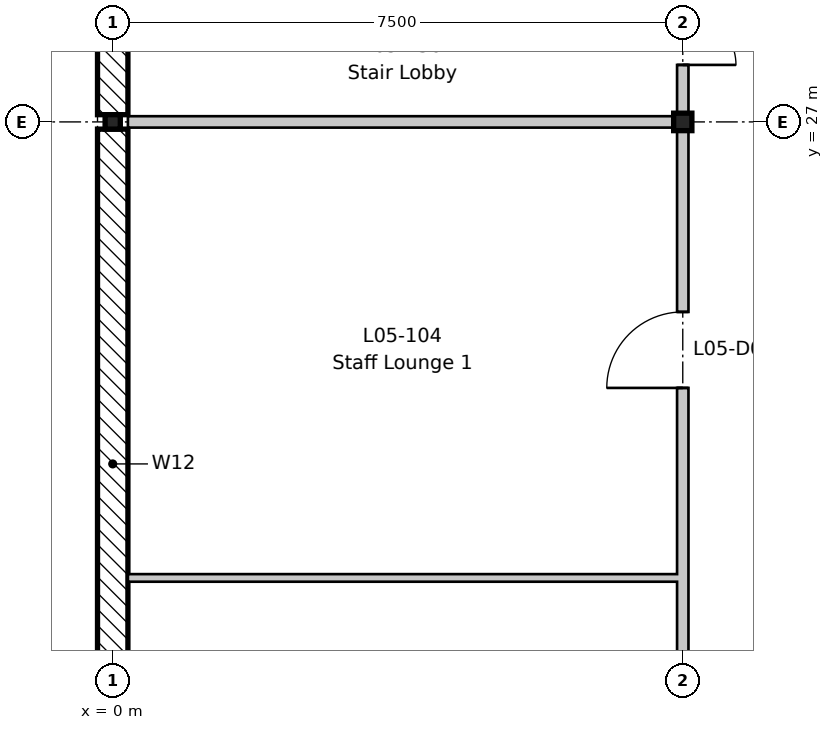
"""IFC4 building model, lengths in metres.
Left out: names, types, materials, properties, quantities, classifications, styles, units other than length and angle.
Written with IfcOpenShell. Run it as: python <this file> out.ifc"""

import sys

from ifc_helpers import new_model, si_unit, direction, frame, frame_2d, origin, origin_2d, place, context, subcontext, project, spatial, rectangle, i_section, extrude, element, fill, save


model = new_model("IFC4")
c1 = context("Model", 3, precision=1e-05, world=origin(), true_north=direction((0.0, 1.0)))
c2 = subcontext(c1, "Body", "Model", "MODEL_VIEW")
j1 = project(units=[si_unit("LENGTHUNIT", "METRE"), si_unit("PLANEANGLEUNIT", "RADIAN")], contexts=[c1])
p1 = place(None, origin())
s1 = spatial("IfcSite", under=j1, at=p1, CompositionType="ELEMENT")
p2 = place(p1, origin())
s2 = spatial("IfcBuilding", under=s1, at=p2, CompositionType="ELEMENT")
p3 = place(p2, frame((0.0, 0.0, 22.8)))
s3 = spatial("IfcBuildingStorey", under=s2, at=p3, CompositionType="ELEMENT", Elevation=22.8)
p4 = place(p3, frame((0.0, 27.0, -0.2), z_axis=(0.0, 0.0, 1.0), x_axis=(1.0, 0.0, 0.0)))
e1 = element("IfcColumn", 1, at=p4, inside=s3, PredefinedType="COLUMN", context=c2, shape_type="SweptSolid", body=[
    extrude(i_section(OverallWidth=0.2, OverallDepth=0.19, WebThickness=0.007, FlangeThickness=0.01, FilletRadius=0.018, at=origin_2d()), origin(), (0.0, 0.0, 1.0), 4.15),
])
p5 = place(p3, frame((7.5, 27.0, -0.2), z_axis=(0.0, 0.0, 1.0), x_axis=(1.0, 0.0, 0.0)))
e2 = element("IfcColumn", 2, at=p5, inside=s3, PredefinedType="COLUMN", context=c2, shape_type="SweptSolid", body=[
    extrude(i_section(OverallWidth=0.24, OverallDepth=0.23, WebThickness=0.008, FlangeThickness=0.012, FilletRadius=0.021, at=origin_2d()), origin(), (0.0, 0.0, 1.0), 4.15),
])
p6 = place(p3, frame((0.0, 18.095, 0.0), z_axis=(0.0, 0.0, 1.0), x_axis=(0.0, 1.0, 0.0)))
e3 = element("IfcWall", 3, at=p6, inside=s3, PredefinedType="STANDARD", context=c2, shape_type="SweptSolid", body=[
    extrude(rectangle(XDim=8.81, YDim=0.4, at=frame_2d((4.405, 0.0))), origin(), (0.0, 0.0, 1.0), 3.55),
])
p7 = place(p3, frame((0.0, 27.095, 0.0), z_axis=(0.0, 0.0, 1.0), x_axis=(0.0, 1.0, 0.0)))
e4 = element("IfcWall", 4, at=p7, inside=s3, PredefinedType="STANDARD", context=c2, shape_type="SweptSolid", body=[
    extrude(rectangle(XDim=8.81, YDim=0.4, at=frame_2d((4.405, 0.0))), origin(), (0.0, 0.0, 1.0), 3.55),
])
p8 = place(p7, frame((3.13, 0.0, 0.9)))
e5 = element("IfcOpeningElement", 5, at=p8, cuts=e4, PredefinedType="OPENING", context=c2, shape_type="SweptSolid", body=[
    extrude(rectangle(XDim=1.05, YDim=2.6, at=frame_2d((0.525, 1.3))), frame((0.0, 0.21, 0.0), z_axis=(0.0, -1.0, 0.0), x_axis=(1.0, 0.0, 0.0)), (0.0, 0.0, 1.0), 0.42),
])
p9 = place(p7, frame((4.63, 0.0, 0.9)))
e6 = element("IfcOpeningElement", 6, at=p9, cuts=e4, PredefinedType="OPENING", context=c2, shape_type="SweptSolid", body=[
    extrude(rectangle(XDim=1.05, YDim=2.6, at=frame_2d((0.525, 1.3))), frame((0.0, 0.21, 0.0), z_axis=(0.0, -1.0, 0.0), x_axis=(1.0, 0.0, 0.0)), (0.0, 0.0, 1.0), 0.42),
])
p10 = place(p3, frame((0.2, 21.0, 0.0), z_axis=(0.0, 0.0, 1.0), x_axis=(1.0, 0.0, 0.0)))
e7 = element("IfcWall", 7, at=p10, inside=s3, PredefinedType="PARTITIONING", context=c2, shape_type="SweptSolid", body=[
    extrude(rectangle(XDim=7.225, YDim=0.1, at=frame_2d((3.613, 0.0))), origin(), (0.0, 0.0, 1.0), 3.95),
])
p11 = place(p3, frame((0.2, 27.0, 0.0), z_axis=(0.0, 0.0, 1.0), x_axis=(1.0, 0.0, 0.0)))
e8 = element("IfcWall", 8, at=p11, inside=s3, PredefinedType="PARTITIONING", context=c2, shape_type="SweptSolid", body=[
    extrude(rectangle(XDim=7.225, YDim=0.15, at=frame_2d((3.613, 0.0))), origin(), (0.0, 0.0, 1.0), 3.6),
])
p12 = place(p3, frame((7.5, -8.8, 0.0), z_axis=(0.0, 0.0, 1.0), x_axis=(0.0, 1.0, 0.0)))
e9 = element("IfcWall", 9, at=p12, inside=s3, PredefinedType="PARTITIONING", context=c2, shape_type="SweptSolid", body=[
    extrude(rectangle(XDim=79.3, YDim=0.15, at=frame_2d((39.65, 0.0))), origin(), (0.0, 0.0, 1.0), 3.43),
])
p13 = place(p12, frame((18.8, 0.0, 0.0)))
e10 = element("IfcOpeningElement", 10, at=p13, cuts=e9, PredefinedType="OPENING", context=c2, shape_type="SweptSolid", body=[
    extrude(rectangle(XDim=1.0, YDim=2.1, at=frame_2d((0.5, 1.05))), frame((0.0, 0.085, 0.0), z_axis=(0.0, -1.0, 0.0), x_axis=(1.0, 0.0, 0.0)), (0.0, 0.0, 1.0), 0.17),
])
p14 = place(p12, frame((23.3, 0.0, 0.0)))
e11 = element("IfcOpeningElement", 11, at=p14, cuts=e9, PredefinedType="OPENING", context=c2, shape_type="SweptSolid", body=[
    extrude(rectangle(XDim=1.0, YDim=2.1, at=frame_2d((0.5, 1.05))), frame((0.0, 0.085, 0.0), z_axis=(0.0, -1.0, 0.0), x_axis=(1.0, 0.0, 0.0)), (0.0, 0.0, 1.0), 0.17),
])
p15 = place(p12, frame((27.8, 0.0, 0.0)))
e12 = element("IfcOpeningElement", 12, at=p15, cuts=e9, PredefinedType="OPENING", context=c2, shape_type="SweptSolid", body=[
    extrude(rectangle(XDim=1.0, YDim=2.1, at=frame_2d((0.5, 1.05))), frame((0.0, 0.085, 0.0), z_axis=(0.0, -1.0, 0.0), x_axis=(1.0, 0.0, 0.0)), (0.0, 0.0, 1.0), 0.17),
])
p16 = place(p12, frame((32.3, 0.0, 0.0)))
e13 = element("IfcOpeningElement", 13, at=p16, cuts=e9, PredefinedType="OPENING", context=c2, shape_type="SweptSolid", body=[
    extrude(rectangle(XDim=1.0, YDim=2.1, at=frame_2d((0.5, 1.05))), frame((0.0, 0.085, 0.0), z_axis=(0.0, -1.0, 0.0), x_axis=(1.0, 0.0, 0.0)), (0.0, 0.0, 1.0), 0.17),
])
p17 = place(p12, frame((45.8, 0.0, 0.0)))
e14 = element("IfcOpeningElement", 14, at=p17, cuts=e9, PredefinedType="OPENING", context=c2, shape_type="SweptSolid", body=[
    extrude(rectangle(XDim=1.0, YDim=2.1, at=frame_2d((0.5, 1.05))), frame((0.0, 0.085, 0.0), z_axis=(0.0, -1.0, 0.0), x_axis=(1.0, 0.0, 0.0)), (0.0, 0.0, 1.0), 0.17),
])
p18 = place(p12, frame((48.8, 0.0, 0.0)))
e15 = element("IfcOpeningElement", 15, at=p18, cuts=e9, PredefinedType="OPENING", context=c2, shape_type="SweptSolid", body=[
    extrude(rectangle(XDim=1.0, YDim=2.1, at=frame_2d((0.5, 1.05))), frame((0.0, 0.085, 0.0), z_axis=(0.0, -1.0, 0.0), x_axis=(1.0, 0.0, 0.0)), (0.0, 0.0, 1.0), 0.17),
])
p19 = place(p12, frame((54.55, 0.0, 0.0)))
e16 = element("IfcOpeningElement", 16, at=p19, cuts=e9, PredefinedType="OPENING", context=c2, shape_type="SweptSolid", body=[
    extrude(rectangle(XDim=1.0, YDim=2.1, at=frame_2d((0.5, 1.05))), frame((0.0, 0.085, 0.0), z_axis=(0.0, -1.0, 0.0), x_axis=(1.0, 0.0, 0.0)), (0.0, 0.0, 1.0), 0.17),
])
p20 = place(p12, frame((57.8, 0.0, 0.0)))
e17 = element("IfcOpeningElement", 17, at=p20, cuts=e9, PredefinedType="OPENING", context=c2, shape_type="SweptSolid", body=[
    extrude(rectangle(XDim=1.0, YDim=2.1, at=frame_2d((0.5, 1.05))), frame((0.0, 0.085, 0.0), z_axis=(0.0, -1.0, 0.0), x_axis=(1.0, 0.0, 0.0)), (0.0, 0.0, 1.0), 0.17),
])
p21 = place(p12, frame((60.8, 0.0, 0.0)))
e18 = element("IfcOpeningElement", 18, at=p21, cuts=e9, PredefinedType="OPENING", context=c2, shape_type="SweptSolid", body=[
    extrude(rectangle(XDim=1.0, YDim=2.1, at=frame_2d((0.5, 1.05))), frame((0.0, 0.085, 0.0), z_axis=(0.0, -1.0, 0.0), x_axis=(1.0, 0.0, 0.0)), (0.0, 0.0, 1.0), 0.17),
])
p22 = place(p12, frame((12.6, 0.0, 0.0)))
e19 = element("IfcOpeningElement", 19, at=p22, cuts=e9, PredefinedType="OPENING", context=c2, shape_type="SweptSolid", body=[
    extrude(rectangle(XDim=1.4, YDim=2.1, at=frame_2d((0.7, 1.05))), frame((0.0, 0.085, 0.0), z_axis=(0.0, -1.0, 0.0), x_axis=(1.0, 0.0, 0.0)), (0.0, 0.0, 1.0), 0.17),
])
p23 = place(p12, frame((3.6, 0.0, 0.0)))
e20 = element("IfcOpeningElement", 20, at=p23, cuts=e9, PredefinedType="OPENING", context=c2, shape_type="SweptSolid", body=[
    extrude(rectangle(XDim=1.4, YDim=2.1, at=frame_2d((0.7, 1.05))), frame((0.0, 0.085, 0.0), z_axis=(0.0, -1.0, 0.0), x_axis=(1.0, 0.0, 0.0)), (0.0, 0.0, 1.0), 0.17),
])
p24 = place(p12, frame((63.55, 0.0, 0.0)))
e21 = element("IfcOpeningElement", 21, at=p24, cuts=e9, PredefinedType="OPENING", context=c2, shape_type="SweptSolid", body=[
    extrude(rectangle(XDim=1.4, YDim=2.1, at=frame_2d((0.7, 1.05))), frame((0.0, 0.085, 0.0), z_axis=(0.0, -1.0, 0.0), x_axis=(1.0, 0.0, 0.0)), (0.0, 0.0, 1.0), 0.17),
])
p25 = place(p12, frame((69.6, 0.0, 0.0)))
e22 = element("IfcOpeningElement", 22, at=p25, cuts=e9, PredefinedType="OPENING", context=c2, shape_type="SweptSolid", body=[
    extrude(rectangle(XDim=1.4, YDim=2.1, at=frame_2d((0.7, 1.05))), frame((0.0, 0.085, 0.0), z_axis=(0.0, -1.0, 0.0), x_axis=(1.0, 0.0, 0.0)), (0.0, 0.0, 1.0), 0.17),
])
p26 = place(p12, frame((42.85, 0.0, 0.0)))
e23 = element("IfcOpeningElement", 23, at=p26, cuts=e9, PredefinedType="OPENING", context=c2, shape_type="SweptSolid", body=[
    extrude(rectangle(XDim=1.0, YDim=2.1, at=frame_2d((0.5, 1.05))), frame((0.0, 0.085, 0.0), z_axis=(0.0, -1.0, 0.0), x_axis=(1.0, 0.0, 0.0)), (0.0, 0.0, 1.0), 0.17),
])
p27 = place(p12, frame((36.55, 0.0, 0.0)))
e24 = element("IfcOpeningElement", 24, at=p27, cuts=e9, PredefinedType="OPENING", context=c2, shape_type="SweptSolid", body=[
    extrude(rectangle(XDim=1.4, YDim=2.1, at=frame_2d((0.7, 1.05))), frame((0.0, 0.085, 0.0), z_axis=(0.0, -1.0, 0.0), x_axis=(1.0, 0.0, 0.0)), (0.0, 0.0, 1.0), 0.17),
])
p28 = place(p12, frame((72.8, 0.0, 0.0)))
e25 = element("IfcOpeningElement", 25, at=p28, cuts=e9, PredefinedType="OPENING", context=c2, shape_type="SweptSolid", body=[
    extrude(rectangle(XDim=1.0, YDim=2.1, at=frame_2d((0.5, 1.05))), frame((0.0, 0.085, 0.0), z_axis=(0.0, -1.0, 0.0), x_axis=(1.0, 0.0, 0.0)), (0.0, 0.0, 1.0), 0.17),
])
p29 = place(p16, origin())
e26 = element("IfcDoor", 26, at=p29, inside=s3, OperationType="SINGLE_SWING_LEFT", PredefinedType="DOOR", context=c2, shape_type="SweptSolid", body=[
    extrude(rectangle(XDim=1.0, YDim=2.1, at=frame_2d((0.5, 1.05))), frame((0.0, 0.025, 0.0), z_axis=(0.0, -1.0, 0.0), x_axis=(1.0, 0.0, 0.0)), (0.0, 0.0, 1.0), 0.05),
])
fill(e13, e26)
p30 = place(p27, frame((1.4, 0.0, 0.0), z_axis=(0.0, 0.0, 1.0), x_axis=(-1.0, 0.0, 0.0)))
e27 = element("IfcDoor", 27, at=p30, inside=s3, OperationType="DOUBLE_DOOR_SINGLE_SWING", PredefinedType="DOOR", context=c2, shape_type="SweptSolid", body=[
    extrude(rectangle(XDim=1.4, YDim=2.1, at=frame_2d((0.7, 1.05))), frame((0.0, 0.025, 0.0), z_axis=(0.0, -1.0, 0.0), x_axis=(1.0, 0.0, 0.0)), (0.0, 0.0, 1.0), 0.05),
])
fill(e24, e27)
save(model, sys.argv[1])
